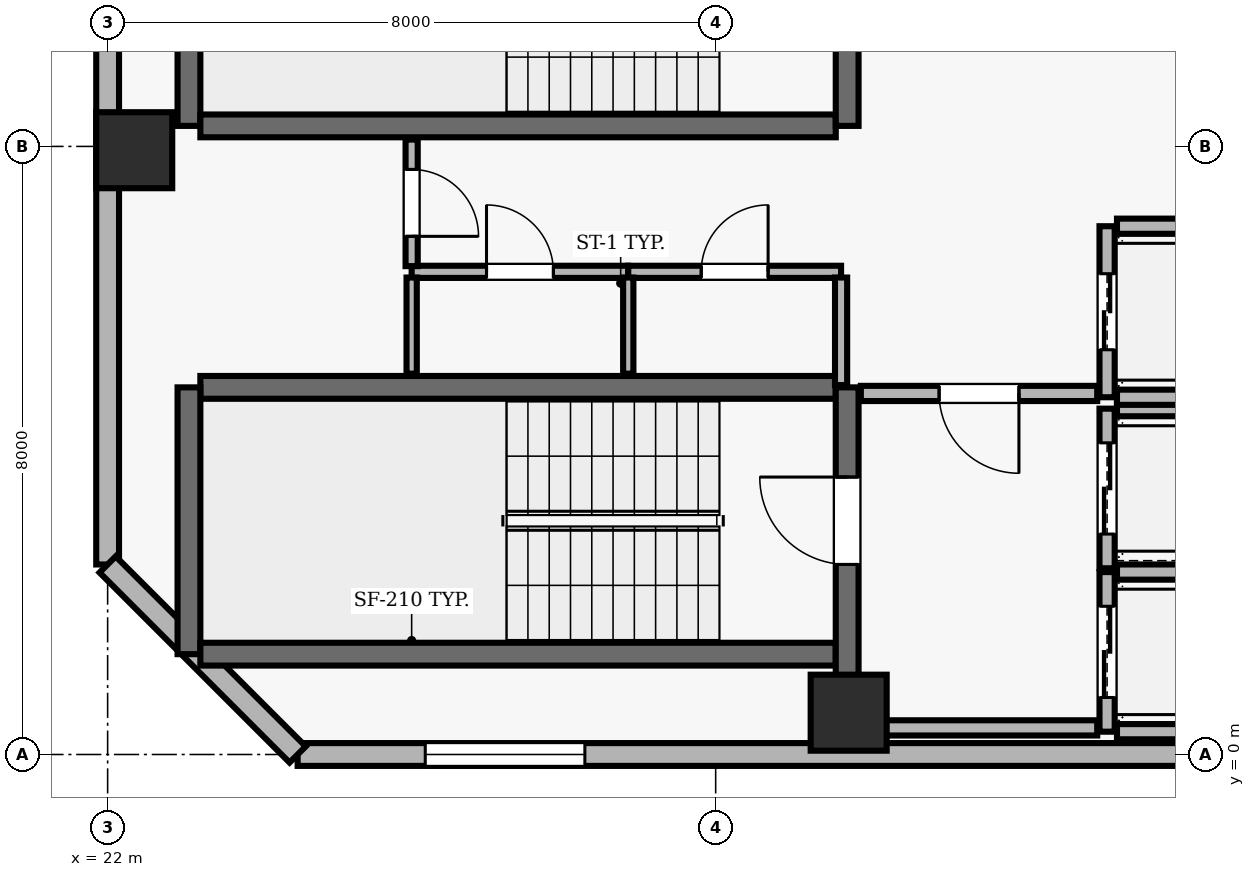
"""IFC4 building model, lengths in metres.
Left out: names, types, materials, properties, quantities, classifications, styles, units other than length and angle.
Written with IfcOpenShell. Run it as: python <this file> out.ifc"""

import sys

from ifc_helpers import new_model, si_unit, direction, frame, frame_2d, origin, origin_2d, place, context, subcontext, project, spatial, rectangle, extrude, element, fill, save


model = new_model("IFC4")
c1 = context("Model", 3, precision=1e-05, world=origin(), true_north=direction((0.0, 1.0)))
c2 = subcontext(c1, "Body", "Model", "MODEL_VIEW")
j1 = project(units=[si_unit("LENGTHUNIT", "METRE"), si_unit("PLANEANGLEUNIT", "RADIAN")], contexts=[c1])
p1 = place(None, origin())
s1 = spatial("IfcSite", under=j1, at=p1, CompositionType="ELEMENT")
p2 = place(p1, origin())
s2 = spatial("IfcBuilding", under=s1, at=p2, CompositionType="ELEMENT")
p3 = place(p2, frame((0.0, 0.0, 210.9)))
s3 = spatial("IfcBuildingStorey", under=s2, at=p3, CompositionType="ELEMENT", Elevation=210.9)
for number, where, z_axis, x_axis in (
    (1, (31.75, 0.55, 0.0), (0.0, 0.0, 1.0), (1.0, 0.0, 0.0)),
    (2, (22.35, 7.95, 0.0), (0.0, 0.0, 1.0), (1.0, 0.0, 0.0)),
):
    element("IfcColumn", number, at=place(p3, frame(where, z_axis=z_axis, x_axis=x_axis)), inside=s3, PredefinedType="COLUMN", context=c2, shape_type="SweptSolid", body=[
        extrude(rectangle(XDim=1.0, YDim=1.0, at=origin_2d()), origin(), (0.0, 0.0, 1.0), 3.9),
    ])
p4 = place(p3, frame((24.5, 0.0, 0.0), z_axis=(0.0, 0.0, 1.0), x_axis=(1.0, 0.0, 0.0)))
e3 = element("IfcWall", 3, at=p4, inside=s3, PredefinedType="SOLIDWALL", context=c2, shape_type="SweptSolid", body=[
    extrude(rectangle(XDim=38.2, YDim=0.3, at=frame_2d((19.1, 0.0))), origin(), (0.0, 0.0, 1.0), 3.69),
])
p5 = place(p4, frame((1.679, 0.0, 0.9)))
e4 = element("IfcOpeningElement", 4, at=p5, cuts=e3, PredefinedType="OPENING", context=c2, shape_type="SweptSolid", body=[
    extrude(rectangle(XDim=2.1, YDim=1.6, at=frame_2d((1.05, 0.8))), frame((0.0, 0.16, 0.0), z_axis=(0.0, -1.0, 0.0), x_axis=(1.0, 0.0, 0.0)), (0.0, 0.0, 1.0), 0.32),
])
p6 = place(p4, frame((18.05, 0.0, 0.9)))
e5 = element("IfcOpeningElement", 5, at=p6, cuts=e3, PredefinedType="OPENING", context=c2, shape_type="SweptSolid", body=[
    extrude(rectangle(XDim=2.1, YDim=1.6, at=frame_2d((1.05, 0.8))), frame((0.0, 0.16, 0.0), z_axis=(0.0, -1.0, 0.0), x_axis=(1.0, 0.0, 0.0)), (0.0, 0.0, 1.0), 0.32),
])
p7 = place(p4, frame((23.507, 0.0, 0.9)))
e6 = element("IfcOpeningElement", 6, at=p7, cuts=e3, PredefinedType="OPENING", context=c2, shape_type="SweptSolid", body=[
    extrude(rectangle(XDim=2.1, YDim=1.6, at=frame_2d((1.05, 0.8))), frame((0.0, 0.16, 0.0), z_axis=(0.0, -1.0, 0.0), x_axis=(1.0, 0.0, 0.0)), (0.0, 0.0, 1.0), 0.32),
])
p8 = place(p4, frame((28.514, 0.0, 0.9)))
e7 = element("IfcOpeningElement", 7, at=p8, cuts=e3, PredefinedType="OPENING", context=c2, shape_type="SweptSolid", body=[
    extrude(rectangle(XDim=2.1, YDim=1.6, at=frame_2d((1.05, 0.8))), frame((0.0, 0.16, 0.0), z_axis=(0.0, -1.0, 0.0), x_axis=(1.0, 0.0, 0.0)), (0.0, 0.0, 1.0), 0.32),
])
p9 = place(p3, frame((22.0, 40.7, 0.0), z_axis=(0.0, 0.0, 1.0), x_axis=(0.0, -1.0, 0.0)))
e8 = element("IfcWall", 8, at=p9, inside=s3, PredefinedType="SOLIDWALL", context=c2, shape_type="SweptSolid", body=[
    extrude(rectangle(XDim=38.2, YDim=0.3, at=frame_2d((19.1, 0.0))), origin(), (0.0, 0.0, 1.0), 3.69),
])
p10 = place(p9, frame((7.8, 0.0, 0.0)))
e9 = element("IfcOpeningElement", 9, at=p10, cuts=e8, PredefinedType="OPENING", context=c2, shape_type="SweptSolid", body=[
    extrude(rectangle(XDim=1.0, YDim=2.2, at=frame_2d((0.5, 1.1))), frame((0.0, 0.16, 0.0), z_axis=(0.0, -1.0, 0.0), x_axis=(1.0, 0.0, 0.0)), (0.0, 0.0, 1.0), 0.32),
])
p11 = place(p9, frame((1.679, 0.0, 0.9)))
e10 = element("IfcOpeningElement", 10, at=p11, cuts=e8, PredefinedType="OPENING", context=c2, shape_type="SweptSolid", body=[
    extrude(rectangle(XDim=2.1, YDim=1.6, at=frame_2d((1.05, 0.8))), frame((0.0, 0.16, 0.0), z_axis=(0.0, -1.0, 0.0), x_axis=(1.0, 0.0, 0.0)), (0.0, 0.0, 1.0), 0.32),
])
p12 = place(p9, frame((11.693, 0.0, 0.9)))
e11 = element("IfcOpeningElement", 11, at=p12, cuts=e8, PredefinedType="OPENING", context=c2, shape_type="SweptSolid", body=[
    extrude(rectangle(XDim=2.1, YDim=1.6, at=frame_2d((1.05, 0.8))), frame((0.0, 0.16, 0.0), z_axis=(0.0, -1.0, 0.0), x_axis=(1.0, 0.0, 0.0)), (0.0, 0.0, 1.0), 0.32),
])
p13 = place(p9, frame((18.05, 0.0, 0.9)))
e12 = element("IfcOpeningElement", 12, at=p13, cuts=e8, PredefinedType="OPENING", context=c2, shape_type="SweptSolid", body=[
    extrude(rectangle(XDim=2.1, YDim=1.6, at=frame_2d((1.05, 0.8))), frame((0.0, 0.16, 0.0), z_axis=(0.0, -1.0, 0.0), x_axis=(1.0, 0.0, 0.0)), (0.0, 0.0, 1.0), 0.32),
])
p14 = place(p9, frame((23.057, 0.0, 0.9)))
e13 = element("IfcOpeningElement", 13, at=p14, cuts=e8, PredefinedType="OPENING", context=c2, shape_type="SweptSolid", body=[
    extrude(rectangle(XDim=2.1, YDim=1.6, at=frame_2d((1.05, 0.8))), frame((0.0, 0.16, 0.0), z_axis=(0.0, -1.0, 0.0), x_axis=(1.0, 0.0, 0.0)), (0.0, 0.0, 1.0), 0.32),
])
p15 = place(p9, frame((28.964, 0.0, 0.9)))
e14 = element("IfcOpeningElement", 14, at=p15, cuts=e8, PredefinedType="OPENING", context=c2, shape_type="SweptSolid", body=[
    extrude(rectangle(XDim=2.1, YDim=1.6, at=frame_2d((1.05, 0.8))), frame((0.0, 0.16, 0.0), z_axis=(0.0, -1.0, 0.0), x_axis=(1.0, 0.0, 0.0)), (0.0, 0.0, 1.0), 0.32),
])
p16 = place(p3, frame((22.0, 2.5, 0.0), z_axis=(0.0, 0.0, 1.0), x_axis=(0.707106781187, -0.707106781187, 0.0)))
e15 = element("IfcWall", 15, at=p16, inside=s3, PredefinedType="SOLIDWALL", context=c2, shape_type="SweptSolid", body=[
    extrude(rectangle(XDim=3.536, YDim=0.3, at=frame_2d((1.768, 0.0))), origin(), (0.0, 0.0, 1.0), 3.69),
])
p17 = place(p3, frame((31.58, 4.83, 0.0), z_axis=(0.0, 0.0, 1.0), x_axis=(-1.0, 0.0, 0.0)))
e16 = element("IfcWall", 16, at=p17, inside=s3, PredefinedType="SHEAR", context=c2, shape_type="SweptSolid", body=[
    extrude(rectangle(XDim=8.36, YDim=0.3, at=frame_2d((4.18, 0.0))), origin(), (0.0, 0.0, 1.0), 3.69),
])
p18 = place(p3, frame((23.07, 4.83, 0.0), z_axis=(0.0, 0.0, 1.0), x_axis=(0.0, -1.0, 0.0)))
e17 = element("IfcWall", 17, at=p18, inside=s3, PredefinedType="SHEAR", context=c2, shape_type="SweptSolid", body=[
    extrude(rectangle(XDim=3.51, YDim=0.3, at=frame_2d((1.755, 0.0))), origin(), (0.0, 0.0, 1.0), 3.69),
])
p19 = place(p3, frame((23.22, 1.32, 0.0), z_axis=(0.0, 0.0, 1.0), x_axis=(1.0, 0.0, 0.0)))
e18 = element("IfcWall", 18, at=p19, inside=s3, PredefinedType="SHEAR", context=c2, shape_type="SweptSolid", body=[
    extrude(rectangle(XDim=8.36, YDim=0.3, at=frame_2d((4.18, 0.0))), origin(), (0.0, 0.0, 1.0), 3.69),
])
p20 = place(p3, frame((31.73, 0.96, 0.0), z_axis=(0.0, 0.0, 1.0), x_axis=(0.0, 1.0, 0.0)))
e19 = element("IfcWall", 19, at=p20, inside=s3, PredefinedType="SHEAR", context=c2, shape_type="SweptSolid", body=[
    extrude(rectangle(XDim=3.87, YDim=0.3, at=frame_2d((1.935, 0.0))), origin(), (0.0, 0.0, 1.0), 3.69),
])
p21 = place(p20, frame((1.54, 0.0, 0.0)))
e20 = element("IfcOpeningElement", 20, at=p21, cuts=e19, PredefinedType="OPENING", context=c2, shape_type="SweptSolid", body=[
    extrude(rectangle(XDim=1.15, YDim=2.15, at=frame_2d((0.575, 1.075))), frame((0.0, 0.16, 0.0), z_axis=(0.0, -1.0, 0.0), x_axis=(1.0, 0.0, 0.0)), (0.0, 0.0, 1.0), 0.32),
])
p22 = place(p3, frame((23.07, 11.78, 0.0), z_axis=(0.0, 0.0, 1.0), x_axis=(0.0, -1.0, 0.0)))
e21 = element("IfcWall", 21, at=p22, inside=s3, PredefinedType="SHEAR", context=c2, shape_type="SweptSolid", body=[
    extrude(rectangle(XDim=3.51, YDim=0.3, at=frame_2d((1.755, 0.0))), origin(), (0.0, 0.0, 1.0), 3.69),
])
p23 = place(p3, frame((23.22, 8.27, 0.0), z_axis=(0.0, 0.0, 1.0), x_axis=(1.0, 0.0, 0.0)))
e22 = element("IfcWall", 22, at=p23, inside=s3, PredefinedType="SHEAR", context=c2, shape_type="SweptSolid", body=[
    extrude(rectangle(XDim=8.36, YDim=0.3, at=frame_2d((4.18, 0.0))), origin(), (0.0, 0.0, 1.0), 3.69),
])
p24 = place(p3, frame((31.73, 8.27, 0.0), z_axis=(0.0, 0.0, 1.0), x_axis=(0.0, 1.0, 0.0)))
e23 = element("IfcWall", 23, at=p24, inside=s3, PredefinedType="SHEAR", context=c2, shape_type="SweptSolid", body=[
    extrude(rectangle(XDim=3.51, YDim=0.3, at=frame_2d((1.755, 0.0))), origin(), (0.0, 0.0, 1.0), 3.69),
])
p25 = place(p24, frame((1.18, 0.0, 0.0)))
e24 = element("IfcOpeningElement", 24, at=p25, cuts=e23, PredefinedType="OPENING", context=c2, shape_type="SweptSolid", body=[
    extrude(rectangle(XDim=1.15, YDim=2.15, at=frame_2d((0.575, 1.075))), frame((0.0, 0.16, 0.0), z_axis=(0.0, -1.0, 0.0), x_axis=(1.0, 0.0, 0.0)), (0.0, 0.0, 1.0), 0.32),
])
p26 = place(p3, frame((35.15, 2.4, 0.0), z_axis=(0.0, 0.0, 1.0), x_axis=(0.0, -1.0, 0.0)))
e25 = element("IfcWall", 25, at=p26, inside=s3, PredefinedType="SOLIDWALL", context=c2, shape_type="SweptSolid", body=[
    extrude(rectangle(XDim=2.1, YDim=0.2, at=frame_2d((1.05, 0.0))), origin(), (0.0, 0.0, 1.0), 3.69),
])
p27 = place(p26, frame((0.45, 0.0, 0.0)))
e26 = element("IfcOpeningElement", 26, at=p27, cuts=e25, PredefinedType="OPENING", context=c2, shape_type="SweptSolid", body=[
    extrude(rectangle(XDim=1.2, YDim=2.15, at=frame_2d((0.6, 1.075))), frame((0.0, 0.11, 0.0), z_axis=(0.0, -1.0, 0.0), x_axis=(1.0, 0.0, 0.0)), (0.0, 0.0, 1.0), 0.22),
])
for number, where, z_axis, x_axis in (
    (27, (35.28, 0.3, 0.0), (0.0, 0.0, 1.0), (1.0, 0.0, 0.0)),
    (28, (37.42, 2.4, 0.0), (0.0, 0.0, 1.0), (-1.0, 0.0, 0.0)),
):
    element("IfcWall", number, at=place(p3, frame(where, z_axis=z_axis, x_axis=x_axis)), inside=s3, PredefinedType="SOLIDWALL", context=c2, shape_type="SweptSolid", body=[
        extrude(rectangle(XDim=2.14, YDim=0.2, at=frame_2d((1.07, 0.0))), origin(), (0.0, 0.0, 1.0), 3.69),
    ])
p28 = place(p3, frame((35.15, 4.55, 0.0), z_axis=(0.0, 0.0, 1.0), x_axis=(0.0, -1.0, 0.0)))
e29 = element("IfcWall", 29, at=p28, inside=s3, PredefinedType="SOLIDWALL", context=c2, shape_type="SweptSolid", body=[
    extrude(rectangle(XDim=2.1, YDim=0.2, at=frame_2d((1.05, 0.0))), origin(), (0.0, 0.0, 1.0), 3.69),
])
p29 = place(p28, frame((0.45, 0.0, 0.0)))
e30 = element("IfcOpeningElement", 30, at=p29, cuts=e29, PredefinedType="OPENING", context=c2, shape_type="SweptSolid", body=[
    extrude(rectangle(XDim=1.2, YDim=2.15, at=frame_2d((0.6, 1.075))), frame((0.0, 0.11, 0.0), z_axis=(0.0, -1.0, 0.0), x_axis=(1.0, 0.0, 0.0)), (0.0, 0.0, 1.0), 0.22),
])
p30 = place(p3, frame((37.42, 4.55, 0.0), z_axis=(0.0, 0.0, 1.0), x_axis=(-1.0, 0.0, 0.0)))
e31 = element("IfcWall", 31, at=p30, inside=s3, PredefinedType="SOLIDWALL", context=c2, shape_type="SweptSolid", body=[
    extrude(rectangle(XDim=2.14, YDim=0.2, at=frame_2d((1.07, 0.0))), origin(), (0.0, 0.0, 1.0), 3.69),
])
p31 = place(p3, frame((35.15, 6.95, 0.0), z_axis=(0.0, 0.0, 1.0), x_axis=(0.0, -1.0, 0.0)))
e32 = element("IfcWall", 32, at=p31, inside=s3, PredefinedType="SOLIDWALL", context=c2, shape_type="SweptSolid", body=[
    extrude(rectangle(XDim=2.25, YDim=0.2, at=frame_2d((1.125, 0.0))), origin(), (0.0, 0.0, 1.0), 3.69),
])
p32 = place(p31, frame((0.625, 0.0, 0.0)))
e33 = element("IfcOpeningElement", 33, at=p32, cuts=e32, PredefinedType="OPENING", context=c2, shape_type="SweptSolid", body=[
    extrude(rectangle(XDim=1.0, YDim=2.1, at=frame_2d((0.5, 1.05))), frame((0.0, 0.11, 0.0), z_axis=(0.0, -1.0, 0.0), x_axis=(1.0, 0.0, 0.0)), (0.0, 0.0, 1.0), 0.22),
])
for number, where, z_axis, x_axis in (
    (34, (35.28, 4.7, 0.0), (0.0, 0.0, 1.0), (1.0, 0.0, 0.0)),
    (35, (37.42, 6.95, 0.0), (0.0, 0.0, 1.0), (-1.0, 0.0, 0.0)),
):
    element("IfcWall", number, at=place(p3, frame(where, z_axis=z_axis, x_axis=x_axis)), inside=s3, PredefinedType="SOLIDWALL", context=c2, shape_type="SweptSolid", body=[
        extrude(rectangle(XDim=2.14, YDim=0.2, at=frame_2d((1.07, 0.0))), origin(), (0.0, 0.0, 1.0), 3.69),
    ])
p33 = place(p3, frame((26.0, 6.35, 0.0), z_axis=(0.0, 0.0, 1.0), x_axis=(1.0, 0.0, 0.0)))
e36 = element("IfcWall", 36, at=p33, inside=s3, PredefinedType="PARTITIONING", context=c2, shape_type="SweptSolid", body=[
    extrude(rectangle(XDim=2.85, YDim=0.16, at=frame_2d((1.425, 0.0))), origin(), (0.0, 0.0, 1.0), 3.69),
])
p34 = place(p33, frame((0.985, 0.0, 0.0)))
e37 = element("IfcOpeningElement", 37, at=p34, cuts=e36, PredefinedType="OPENING", context=c2, shape_type="SweptSolid", body=[
    extrude(rectangle(XDim=0.88, YDim=2.1, at=frame_2d((0.44, 1.05))), frame((0.0, 0.09, 0.0), z_axis=(0.0, -1.0, 0.0), x_axis=(1.0, 0.0, 0.0)), (0.0, 0.0, 1.0), 0.18),
])
p35 = place(p3, frame((28.85, 6.35, 0.0), z_axis=(0.0, 0.0, 1.0), x_axis=(1.0, 0.0, 0.0)))
e38 = element("IfcWall", 38, at=p35, inside=s3, PredefinedType="PARTITIONING", context=c2, shape_type="SweptSolid", body=[
    extrude(rectangle(XDim=2.8, YDim=0.16, at=frame_2d((1.4, 0.0))), origin(), (0.0, 0.0, 1.0), 3.69),
])
p36 = place(p35, frame((0.96, 0.0, 0.0)))
e39 = element("IfcOpeningElement", 39, at=p36, cuts=e38, PredefinedType="OPENING", context=c2, shape_type="SweptSolid", body=[
    extrude(rectangle(XDim=0.88, YDim=2.1, at=frame_2d((0.44, 1.05))), frame((0.0, 0.09, 0.0), z_axis=(0.0, -1.0, 0.0), x_axis=(1.0, 0.0, 0.0)), (0.0, 0.0, 1.0), 0.18),
])
p37 = place(p3, frame((31.65, 0.35, 0.0), z_axis=(0.0, 0.0, 1.0), x_axis=(1.0, 0.0, 0.0)))
e40 = element("IfcWall", 40, at=p37, inside=s3, PredefinedType="SOLIDWALL", context=c2, shape_type="SweptSolid", body=[
    extrude(rectangle(XDim=3.37, YDim=0.2, at=frame_2d((1.685, 0.0))), origin(), (0.0, 0.0, 1.0), 3.69),
])
p38 = place(p3, frame((35.02, 4.75, 0.0), z_axis=(0.0, 0.0, 1.0), x_axis=(-1.0, 0.0, 0.0)))
e41 = element("IfcWall", 41, at=p38, inside=s3, PredefinedType="SOLIDWALL", context=c2, shape_type="SweptSolid", body=[
    extrude(rectangle(XDim=3.11, YDim=0.2, at=frame_2d((1.555, 0.0))), origin(), (0.0, 0.0, 1.0), 3.69),
])
p39 = place(p38, frame((1.03, 0.0, 0.0)))
e42 = element("IfcOpeningElement", 42, at=p39, cuts=e41, PredefinedType="OPENING", context=c2, shape_type="SweptSolid", body=[
    extrude(rectangle(XDim=1.05, YDim=2.15, at=frame_2d((0.525, 1.075))), frame((0.0, 0.11, 0.0), z_axis=(0.0, -1.0, 0.0), x_axis=(1.0, 0.0, 0.0)), (0.0, 0.0, 1.0), 0.22),
])
p40 = place(p3, frame((26.0, 5.01, 0.0), z_axis=(0.0, 0.0, 1.0), x_axis=(0.0, 1.0, 0.0)))
e43 = element("IfcWall", 43, at=p40, inside=s3, PredefinedType="PARTITIONING", context=c2, shape_type="SweptSolid", body=[
    extrude(rectangle(XDim=1.265, YDim=0.135, at=frame_2d((0.632, 0.0))), origin(), (0.0, 0.0, 1.0), 3.69),
])
p41 = place(p3, frame((26.0, 8.09, 0.0), z_axis=(0.0, 0.0, 1.0), x_axis=(0.0, -1.0, 0.0)))
e44 = element("IfcWall", 44, at=p41, inside=s3, PredefinedType="PARTITIONING", context=c2, shape_type="SweptSolid", body=[
    extrude(rectangle(XDim=1.665, YDim=0.16, at=frame_2d((0.833, 0.0))), origin(), (0.0, 0.0, 1.0), 3.69),
])
p42 = place(p41, frame((0.393, 0.0, 0.0)))
e45 = element("IfcOpeningElement", 45, at=p42, cuts=e44, PredefinedType="OPENING", context=c2, shape_type="SweptSolid", body=[
    extrude(rectangle(XDim=0.88, YDim=2.1, at=frame_2d((0.44, 1.05))), frame((0.0, 0.09, 0.0), z_axis=(0.0, -1.0, 0.0), x_axis=(1.0, 0.0, 0.0)), (0.0, 0.0, 1.0), 0.18),
])
p43 = place(p3, frame((28.85, 5.01, 0.0), z_axis=(0.0, 0.0, 1.0), x_axis=(0.0, 1.0, 0.0)))
e46 = element("IfcWall", 46, at=p43, inside=s3, PredefinedType="PARTITIONING", context=c2, shape_type="SweptSolid", body=[
    extrude(rectangle(XDim=1.265, YDim=0.135, at=frame_2d((0.632, 0.0))), origin(), (0.0, 0.0, 1.0), 3.69),
])
p44 = place(p3, frame((31.65, 4.86, 0.0), z_axis=(0.0, 0.0, 1.0), x_axis=(0.0, 1.0, 0.0)))
e47 = element("IfcWall", 47, at=p44, inside=s3, PredefinedType="PARTITIONING", context=c2, shape_type="SweptSolid", body=[
    extrude(rectangle(XDim=1.415, YDim=0.16, at=frame_2d((0.708, 0.0))), origin(), (0.0, 0.0, 1.0), 3.69),
])
p45 = place(p5, origin())
e48 = element("IfcWindow", 48, at=p45, inside=s3, PartitioningType="SINGLE_PANEL", PredefinedType="WINDOW", context=c2, shape_type="SweptSolid", body=[
    extrude(rectangle(XDim=2.1, YDim=1.6, at=frame_2d((1.05, 0.8))), frame((0.0, 0.03, 0.0), z_axis=(0.0, -1.0, 0.0), x_axis=(1.0, 0.0, 0.0)), (0.0, 0.0, 1.0), 0.06),
])
fill(e4, e48)
p46 = place(p21, origin())
e49 = element("IfcDoor", 49, at=p46, inside=s3, OperationType="SINGLE_SWING_RIGHT", PredefinedType="DOOR", context=c2, shape_type="SweptSolid", body=[
    extrude(rectangle(XDim=1.15, YDim=2.15, at=frame_2d((0.575, 1.075))), frame((0.0, 0.025, 0.0), z_axis=(0.0, -1.0, 0.0), x_axis=(1.0, 0.0, 0.0)), (0.0, 0.0, 1.0), 0.05),
])
fill(e20, e49)
p47 = place(p27, origin())
e50 = element("IfcDoor", 50, at=p47, inside=s3, OperationType="DOUBLE_DOOR_SLIDING", PredefinedType="DOOR", context=c2, shape_type="SweptSolid", body=[
    extrude(rectangle(XDim=1.2, YDim=2.15, at=frame_2d((0.6, 1.075))), frame((0.0, 0.025, 0.0), z_axis=(0.0, -1.0, 0.0), x_axis=(1.0, 0.0, 0.0)), (0.0, 0.0, 1.0), 0.05),
])
fill(e26, e50)
p48 = place(p29, origin())
e51 = element("IfcDoor", 51, at=p48, inside=s3, OperationType="DOUBLE_DOOR_SLIDING", PredefinedType="DOOR", context=c2, shape_type="SweptSolid", body=[
    extrude(rectangle(XDim=1.2, YDim=2.15, at=frame_2d((0.6, 1.075))), frame((0.0, 0.025, 0.0), z_axis=(0.0, -1.0, 0.0), x_axis=(1.0, 0.0, 0.0)), (0.0, 0.0, 1.0), 0.05),
])
fill(e30, e51)
p49 = place(p32, origin())
e52 = element("IfcDoor", 52, at=p49, inside=s3, OperationType="DOUBLE_DOOR_SLIDING", PredefinedType="DOOR", context=c2, shape_type="SweptSolid", body=[
    extrude(rectangle(XDim=1.0, YDim=2.1, at=frame_2d((0.5, 1.05))), frame((0.0, 0.025, 0.0), z_axis=(0.0, -1.0, 0.0), x_axis=(1.0, 0.0, 0.0)), (0.0, 0.0, 1.0), 0.05),
])
fill(e33, e52)
p50 = place(p39, origin())
e53 = element("IfcDoor", 53, at=p50, inside=s3, OperationType="SINGLE_SWING_LEFT", PredefinedType="DOOR", context=c2, shape_type="SweptSolid", body=[
    extrude(rectangle(XDim=1.05, YDim=2.15, at=frame_2d((0.525, 1.075))), frame((0.0, 0.025, 0.0), z_axis=(0.0, -1.0, 0.0), x_axis=(1.0, 0.0, 0.0)), (0.0, 0.0, 1.0), 0.05),
])
fill(e42, e53)
p51 = place(p42, origin())
e54 = element("IfcDoor", 54, at=p51, inside=s3, OperationType="SINGLE_SWING_RIGHT", PredefinedType="DOOR", context=c2, shape_type="SweptSolid", body=[
    extrude(rectangle(XDim=0.88, YDim=2.1, at=frame_2d((0.44, 1.05))), frame((0.0, 0.025, 0.0), z_axis=(0.0, -1.0, 0.0), x_axis=(1.0, 0.0, 0.0)), (0.0, 0.0, 1.0), 0.05),
])
fill(e45, e54)
p52 = place(p34, origin())
e55 = element("IfcDoor", 55, at=p52, inside=s3, OperationType="SINGLE_SWING_LEFT", PredefinedType="DOOR", context=c2, shape_type="SweptSolid", body=[
    extrude(rectangle(XDim=0.88, YDim=2.1, at=frame_2d((0.44, 1.05))), frame((0.0, 0.025, 0.0), z_axis=(0.0, -1.0, 0.0), x_axis=(1.0, 0.0, 0.0)), (0.0, 0.0, 1.0), 0.05),
])
fill(e37, e55)
p53 = place(p36, origin())
e56 = element("IfcDoor", 56, at=p53, inside=s3, OperationType="SINGLE_SWING_RIGHT", PredefinedType="DOOR", context=c2, shape_type="SweptSolid", body=[
    extrude(rectangle(XDim=0.88, YDim=2.1, at=frame_2d((0.44, 1.05))), frame((0.0, 0.025, 0.0), z_axis=(0.0, -1.0, 0.0), x_axis=(1.0, 0.0, 0.0)), (0.0, 0.0, 1.0), 0.05),
])
fill(e39, e56)
save(model, sys.argv[1])
